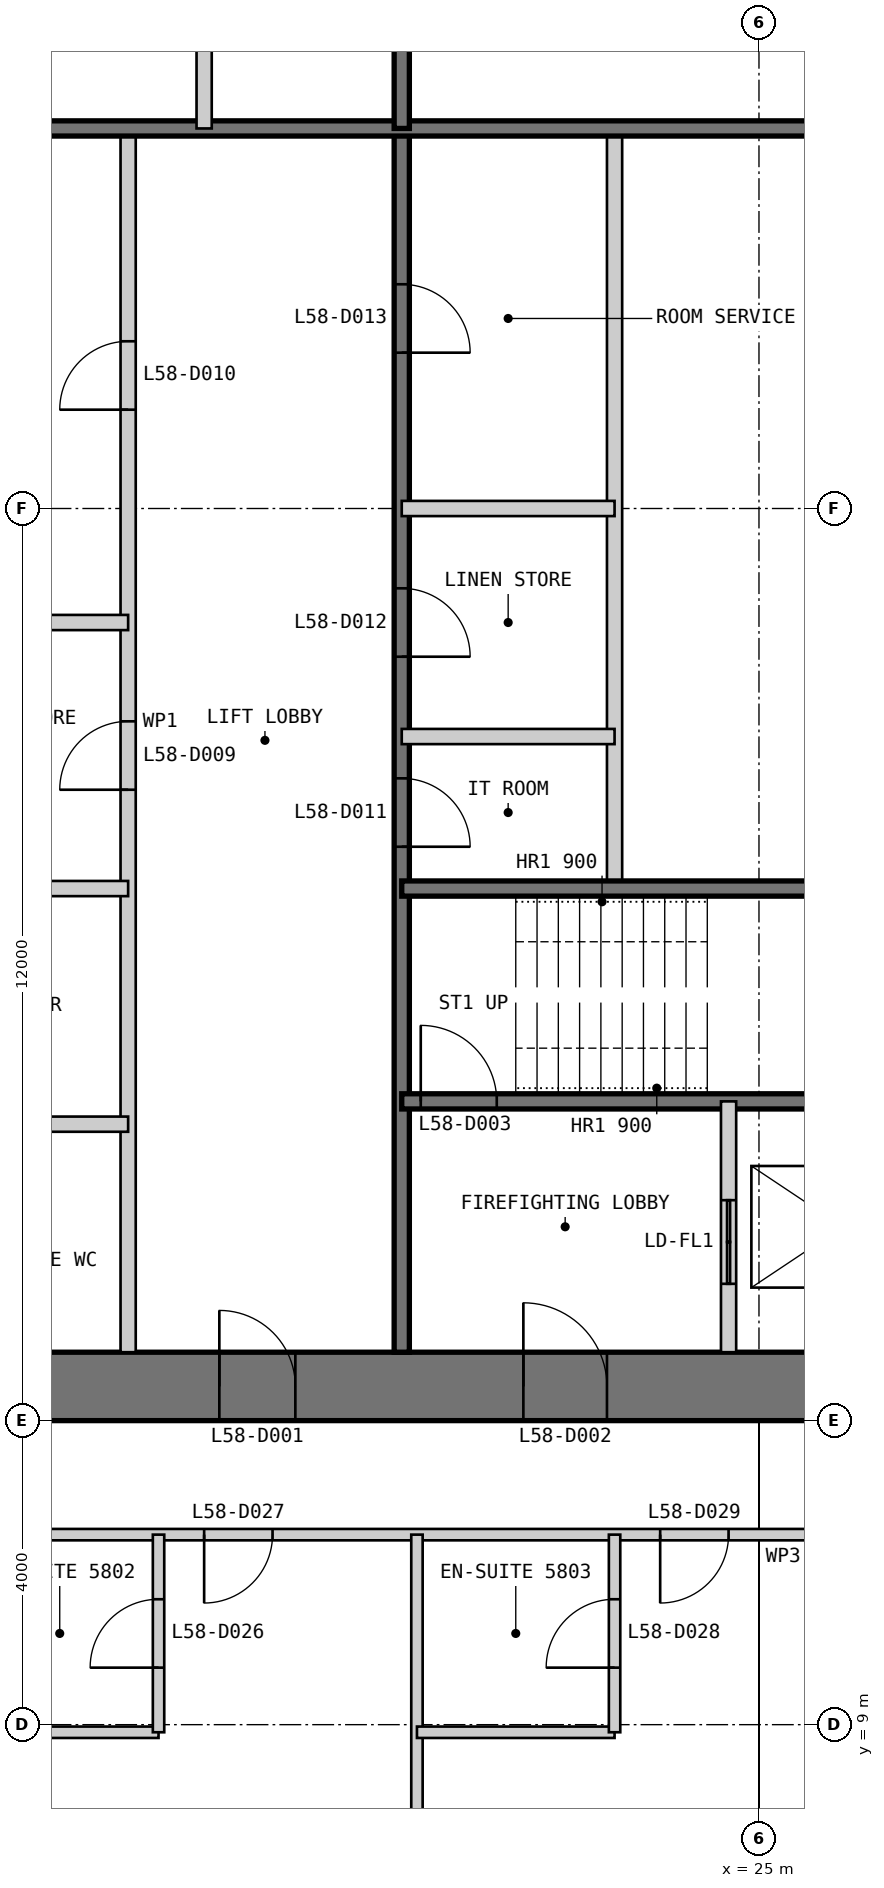
"""IFC4 building model, lengths in metres.
Left out: names, types, materials, properties, quantities, classifications, styles, units other than length and angle.
Written with IfcOpenShell. Run it as: python <this file> out.ifc"""

import sys

from ifc_helpers import new_model, si_unit, direction, frame, frame_2d, origin, place, context, subcontext, project, spatial, polyline, rectangle, outline, extrude, element, fill, save


model = new_model("IFC4")
c1 = context("Model", 3, precision=1e-05, world=origin(), true_north=direction((0.0, 1.0)))
c2 = subcontext(c1, "Body", "Model", "MODEL_VIEW")
j1 = project(units=[si_unit("LENGTHUNIT", "METRE"), si_unit("PLANEANGLEUNIT", "RADIAN")], contexts=[c1])
p1 = place(None, origin())
s1 = spatial("IfcSite", under=j1, at=p1, CompositionType="ELEMENT")
p2 = place(p1, origin())
s2 = spatial("IfcBuilding", under=s1, at=p2, CompositionType="ELEMENT")
p3 = place(p2, frame((0.0, 0.0, 249.2)))
s3 = spatial("IfcBuildingStorey", under=s2, at=p3, CompositionType="ELEMENT", Elevation=249.2)
p4 = place(p3, frame((13.0, 13.45, 0.0), z_axis=(0.0, 0.0, 1.0), x_axis=(1.0, 0.0, 0.0)))
e1 = element("IfcWall", 1, at=p4, inside=s3, PredefinedType="SHEAR", context=c2, shape_type="SweptSolid", body=[
    extrude(outline(polyline([(0.0, -0.45), (24.0, -0.45), (23.1, 0.45), (0.9, 0.45), (0.0, -0.45)])), origin(), (0.0, 0.0, 1.0), 3.4),
])
p5 = place(p4, frame((4.9, 0.0, 0.0)))
e2 = element("IfcOpeningElement", 2, at=p5, cuts=e1, PredefinedType="OPENING", context=c2, shape_type="SweptSolid", body=[
    extrude(rectangle(XDim=1.0, YDim=2.2, at=frame_2d((0.5, 1.1))), frame((0.0, 0.46, 0.0), z_axis=(0.0, -1.0, 0.0), x_axis=(1.0, 0.0, 0.0)), (0.0, 0.0, 1.0), 0.92),
])
p6 = place(p4, frame((8.9, 0.0, 0.0)))
e3 = element("IfcOpeningElement", 3, at=p6, cuts=e1, PredefinedType="OPENING", context=c2, shape_type="SweptSolid", body=[
    extrude(rectangle(XDim=1.1, YDim=2.2, at=frame_2d((0.55, 1.1))), frame((0.0, 0.46, 0.0), z_axis=(0.0, -1.0, 0.0), x_axis=(1.0, 0.0, 0.0)), (0.0, 0.0, 1.0), 0.92),
])
p7 = place(p4, frame((15.05, 0.0, 0.0)))
e4 = element("IfcOpeningElement", 4, at=p7, cuts=e1, PredefinedType="OPENING", context=c2, shape_type="SweptSolid", body=[
    extrude(rectangle(XDim=0.9, YDim=2.2, at=frame_2d((0.45, 1.1))), frame((0.0, 0.46, 0.0), z_axis=(0.0, -1.0, 0.0), x_axis=(1.0, 0.0, 0.0)), (0.0, 0.0, 1.0), 0.92),
])
p8 = place(p4, frame((17.9, 0.0, 0.0)))
e5 = element("IfcOpeningElement", 5, at=p8, cuts=e1, PredefinedType="OPENING", context=c2, shape_type="SweptSolid", body=[
    extrude(rectangle(XDim=1.0, YDim=2.2, at=frame_2d((0.5, 1.1))), frame((0.0, 0.46, 0.0), z_axis=(0.0, -1.0, 0.0), x_axis=(1.0, 0.0, 0.0)), (0.0, 0.0, 1.0), 0.92),
])
p9 = place(p4, frame((21.4, 0.0, 0.0)))
e6 = element("IfcOpeningElement", 6, at=p9, cuts=e1, PredefinedType="OPENING", context=c2, shape_type="SweptSolid", body=[
    extrude(rectangle(XDim=1.0, YDim=2.2, at=frame_2d((0.5, 1.1))), frame((0.0, 0.46, 0.0), z_axis=(0.0, -1.0, 0.0), x_axis=(1.0, 0.0, 0.0)), (0.0, 0.0, 1.0), 0.92),
])
p10 = place(p3, frame((16.7, 13.9, 0.0), z_axis=(0.0, 0.0, 1.0), x_axis=(0.0, 1.0, 0.0)))
e7 = element("IfcWall", 7, at=p10, inside=s3, PredefinedType="PARTITIONING", context=c2, shape_type="SweptSolid", body=[
    extrude(rectangle(XDim=16.1, YDim=0.2, at=frame_2d((8.05, 0.0))), origin(), (0.0, 0.0, 1.0), 3.2),
])
p11 = place(p10, frame((7.4, 0.0, 0.0)))
e8 = element("IfcOpeningElement", 8, at=p11, cuts=e7, PredefinedType="OPENING", context=c2, shape_type="SweptSolid", body=[
    extrude(rectangle(XDim=0.9, YDim=2.2, at=frame_2d((0.45, 1.1))), frame((0.0, 0.11, 0.0), z_axis=(0.0, -1.0, 0.0), x_axis=(1.0, 0.0, 0.0)), (0.0, 0.0, 1.0), 0.22),
])
p12 = place(p10, frame((12.4, 0.0, 0.0)))
e9 = element("IfcOpeningElement", 9, at=p12, cuts=e7, PredefinedType="OPENING", context=c2, shape_type="SweptSolid", body=[
    extrude(rectangle(XDim=0.9, YDim=2.2, at=frame_2d((0.45, 1.1))), frame((0.0, 0.11, 0.0), z_axis=(0.0, -1.0, 0.0), x_axis=(1.0, 0.0, 0.0)), (0.0, 0.0, 1.0), 0.22),
])
p13 = place(p3, frame((20.3, 13.9, 0.0), z_axis=(0.0, 0.0, 1.0), x_axis=(0.0, 1.0, 0.0)))
e10 = element("IfcWall", 10, at=p13, inside=s3, PredefinedType="SOLIDWALL", context=c2, shape_type="SweptSolid", body=[
    extrude(rectangle(XDim=16.1, YDim=0.2, at=frame_2d((8.05, 0.0))), origin(), (0.0, 0.0, 1.0), 3.2),
])
p14 = place(p13, frame((6.65, 0.0, 0.0)))
e11 = element("IfcOpeningElement", 11, at=p14, cuts=e10, PredefinedType="OPENING", context=c2, shape_type="SweptSolid", body=[
    extrude(rectangle(XDim=0.9, YDim=2.2, at=frame_2d((0.45, 1.1))), frame((0.0, 0.11, 0.0), z_axis=(0.0, -1.0, 0.0), x_axis=(1.0, 0.0, 0.0)), (0.0, 0.0, 1.0), 0.22),
])
p15 = place(p13, frame((9.15, 0.0, 0.0)))
e12 = element("IfcOpeningElement", 12, at=p15, cuts=e10, PredefinedType="OPENING", context=c2, shape_type="SweptSolid", body=[
    extrude(rectangle(XDim=0.9, YDim=2.2, at=frame_2d((0.45, 1.1))), frame((0.0, 0.11, 0.0), z_axis=(0.0, -1.0, 0.0), x_axis=(1.0, 0.0, 0.0)), (0.0, 0.0, 1.0), 0.22),
])
p16 = place(p13, frame((13.15, 0.0, 0.0)))
e13 = element("IfcOpeningElement", 13, at=p16, cuts=e10, PredefinedType="OPENING", context=c2, shape_type="SweptSolid", body=[
    extrude(rectangle(XDim=0.9, YDim=2.2, at=frame_2d((0.45, 1.1))), frame((0.0, 0.11, 0.0), z_axis=(0.0, -1.0, 0.0), x_axis=(1.0, 0.0, 0.0)), (0.0, 0.0, 1.0), 0.22),
])
p17 = place(p3, frame((23.1, 20.0, 0.0), z_axis=(0.0, 0.0, 1.0), x_axis=(0.0, 1.0, 0.0)))
e14 = element("IfcWall", 14, at=p17, inside=s3, PredefinedType="PARTITIONING", context=c2, shape_type="SweptSolid", body=[
    extrude(rectangle(XDim=10.0, YDim=0.2, at=frame_2d((5.0, 0.0))), origin(), (0.0, 0.0, 1.0), 3.2),
])
p18 = place(p3, frame((20.3, 17.2, 0.0), z_axis=(0.0, 0.0, 1.0), x_axis=(1.0, 0.0, 0.0)))
e15 = element("IfcWall", 15, at=p18, inside=s3, PredefinedType="SOLIDWALL", context=c2, shape_type="SweptSolid", body=[
    extrude(rectangle(XDim=9.4, YDim=0.2, at=frame_2d((4.7, 0.0))), origin(), (0.0, 0.0, 1.0), 3.2),
])
p19 = place(p18, frame((0.25, 0.0, 0.0)))
e16 = element("IfcOpeningElement", 16, at=p19, cuts=e15, PredefinedType="OPENING", context=c2, shape_type="SweptSolid", body=[
    extrude(rectangle(XDim=1.0, YDim=2.2, at=frame_2d((0.5, 1.1))), frame((0.0, 0.11, 0.0), z_axis=(0.0, -1.0, 0.0), x_axis=(1.0, 0.0, 0.0)), (0.0, 0.0, 1.0), 0.22),
])
p20 = place(p3, frame((20.3, 20.0, 0.0), z_axis=(0.0, 0.0, 1.0), x_axis=(1.0, 0.0, 0.0)))
e17 = element("IfcWall", 17, at=p20, inside=s3, PredefinedType="SOLIDWALL", context=c2, shape_type="SweptSolid", body=[
    extrude(rectangle(XDim=15.8, YDim=0.2, at=frame_2d((7.9, 0.0))), origin(), (0.0, 0.0, 1.0), 3.2),
])
p21 = place(p3, frame((24.6, 13.9, 0.0), z_axis=(0.0, 0.0, 1.0), x_axis=(0.0, 1.0, 0.0)))
e18 = element("IfcWall", 18, at=p21, inside=s3, PredefinedType="PARTITIONING", context=c2, shape_type="SweptSolid", body=[
    extrude(rectangle(XDim=3.3, YDim=0.2, at=frame_2d((1.65, 0.0))), origin(), (0.0, 0.0, 1.0), 3.2),
])
p22 = place(p21, frame((0.9, 0.0, 0.0)))
e19 = element("IfcOpeningElement", 19, at=p22, cuts=e18, PredefinedType="OPENING", context=c2, shape_type="SweptSolid", body=[
    extrude(rectangle(XDim=1.1, YDim=2.2, at=frame_2d((0.55, 1.1))), frame((0.0, 0.11, 0.0), z_axis=(0.0, -1.0, 0.0), x_axis=(1.0, 0.0, 0.0)), (0.0, 0.0, 1.0), 0.22),
])
for number, where, z_axis, x_axis in (
    (20, (13.9, 16.9, 0.0), (0.0, 0.0, 1.0), (1.0, 0.0, 0.0)),
    (21, (13.9, 20.0, 0.0), (0.0, 0.0, 1.0), (1.0, 0.0, 0.0)),
    (22, (13.9, 23.5, 0.0), (0.0, 0.0, 1.0), (1.0, 0.0, 0.0)),
    (23, (20.3, 22.0, 0.0), (0.0, 0.0, 1.0), (1.0, 0.0, 0.0)),
    (24, (20.3, 25.0, 0.0), (0.0, 0.0, 1.0), (1.0, 0.0, 0.0)),
):
    element("IfcWall", number, at=place(p3, frame(where, z_axis=z_axis, x_axis=x_axis)), inside=s3, PredefinedType="PARTITIONING", context=c2, shape_type="SweptSolid", body=[
        extrude(rectangle(XDim=2.8, YDim=0.2, at=frame_2d((1.4, 0.0))), origin(), (0.0, 0.0, 1.0), 3.2),
    ])
p23 = place(p3, frame((29.7, 30.0, 0.0), z_axis=(0.0, 0.0, 1.0), x_axis=(-1.0, 0.0, 0.0)))
e25 = element("IfcWall", 25, at=p23, inside=s3, PredefinedType="SOLIDWALL", context=c2, shape_type="SweptSolid", body=[
    extrude(rectangle(XDim=15.8, YDim=0.2, at=frame_2d((7.9, 0.0))), origin(), (0.0, 0.0, 1.0), 3.2),
])
p24 = place(p3, frame((20.3, 36.1, 0.0), z_axis=(0.0, 0.0, 1.0), x_axis=(0.0, -1.0, 0.0)))
e26 = element("IfcWall", 26, at=p24, inside=s3, PredefinedType="SOLIDWALL", context=c2, shape_type="SweptSolid", body=[
    extrude(rectangle(XDim=6.1, YDim=0.2, at=frame_2d((3.05, 0.0))), origin(), (0.0, 0.0, 1.0), 3.2),
])
p25 = place(p3, frame((17.7, 36.1, 0.0), z_axis=(0.0, 0.0, 1.0), x_axis=(0.0, -1.0, 0.0)))
e27 = element("IfcWall", 27, at=p25, inside=s3, PredefinedType="PARTITIONING", context=c2, shape_type="SweptSolid", body=[
    extrude(rectangle(XDim=6.1, YDim=0.2, at=frame_2d((3.05, 0.0))), origin(), (0.0, 0.0, 1.0), 3.2),
])
p26 = place(p3, frame((11.5, 11.5, 0.0), z_axis=(0.0, 0.0, 1.0), x_axis=(1.0, 0.0, 0.0)))
e28 = element("IfcWall", 28, at=p26, inside=s3, PredefinedType="PARTITIONING", context=c2, shape_type="SweptSolid", body=[
    extrude(rectangle(XDim=27.0, YDim=0.15, at=frame_2d((13.5, 0.0))), origin(), (0.0, 0.0, 1.0), 3.25),
])
p27 = place(p26, frame((1.85, 0.0, 0.0)))
e29 = element("IfcOpeningElement", 29, at=p27, cuts=e28, PredefinedType="OPENING", context=c2, shape_type="SweptSolid", body=[
    extrude(rectangle(XDim=0.9, YDim=2.1, at=frame_2d((0.45, 1.05))), frame((0.0, 0.085, 0.0), z_axis=(0.0, -1.0, 0.0), x_axis=(1.0, 0.0, 0.0)), (0.0, 0.0, 1.0), 0.17),
])
p28 = place(p26, frame((6.2, 0.0, 0.0)))
e30 = element("IfcOpeningElement", 30, at=p28, cuts=e28, PredefinedType="OPENING", context=c2, shape_type="SweptSolid", body=[
    extrude(rectangle(XDim=0.9, YDim=2.1, at=frame_2d((0.45, 1.05))), frame((0.0, 0.085, 0.0), z_axis=(0.0, -1.0, 0.0), x_axis=(1.0, 0.0, 0.0)), (0.0, 0.0, 1.0), 0.17),
])
p29 = place(p26, frame((12.2, 0.0, 0.0)))
e31 = element("IfcOpeningElement", 31, at=p29, cuts=e28, PredefinedType="OPENING", context=c2, shape_type="SweptSolid", body=[
    extrude(rectangle(XDim=0.9, YDim=2.1, at=frame_2d((0.45, 1.05))), frame((0.0, 0.085, 0.0), z_axis=(0.0, -1.0, 0.0), x_axis=(1.0, 0.0, 0.0)), (0.0, 0.0, 1.0), 0.17),
])
p30 = place(p26, frame((18.8, 0.0, 0.0)))
e32 = element("IfcOpeningElement", 32, at=p30, cuts=e28, PredefinedType="OPENING", context=c2, shape_type="SweptSolid", body=[
    extrude(rectangle(XDim=1.0, YDim=2.1, at=frame_2d((0.5, 1.05))), frame((0.0, 0.085, 0.0), z_axis=(0.0, -1.0, 0.0), x_axis=(1.0, 0.0, 0.0)), (0.0, 0.0, 1.0), 0.17),
])
p31 = place(p26, frame((24.2, 0.0, 0.0)))
e33 = element("IfcOpeningElement", 33, at=p31, cuts=e28, PredefinedType="OPENING", context=c2, shape_type="SweptSolid", body=[
    extrude(rectangle(XDim=0.9, YDim=2.1, at=frame_2d((0.45, 1.05))), frame((0.0, 0.085, 0.0), z_axis=(0.0, -1.0, 0.0), x_axis=(1.0, 0.0, 0.0)), (0.0, 0.0, 1.0), 0.17),
])
p32 = place(p3, frame((14.5, 8.9, 0.0), z_axis=(0.0, 0.0, 1.0), x_axis=(1.0, 0.0, 0.0)))
e34 = element("IfcWall", 34, at=p32, inside=s3, PredefinedType="PARTITIONING", context=c2, shape_type="SweptSolid", body=[
    extrude(rectangle(XDim=2.6, YDim=0.15, at=frame_2d((1.3, 0.0))), origin(), (0.0, 0.0, 1.0), 3.25),
])
p33 = place(p3, frame((17.1, 8.9, 0.0), z_axis=(0.0, 0.0, 1.0), x_axis=(0.0, 1.0, 0.0)))
e35 = element("IfcWall", 35, at=p33, inside=s3, PredefinedType="PARTITIONING", context=c2, shape_type="SweptSolid", body=[
    extrude(rectangle(XDim=2.6, YDim=0.15, at=frame_2d((1.3, 0.0))), origin(), (0.0, 0.0, 1.0), 3.25),
])
p34 = place(p33, frame((0.85, 0.0, 0.0)))
e36 = element("IfcOpeningElement", 36, at=p34, cuts=e35, PredefinedType="OPENING", context=c2, shape_type="SweptSolid", body=[
    extrude(rectangle(XDim=0.9, YDim=2.1, at=frame_2d((0.45, 1.05))), frame((0.0, 0.085, 0.0), z_axis=(0.0, -1.0, 0.0), x_axis=(1.0, 0.0, 0.0)), (0.0, 0.0, 1.0), 0.17),
])
p35 = place(p3, frame((20.5, 0.15, 0.0), z_axis=(0.0, 0.0, 1.0), x_axis=(0.0, 1.0, 0.0)))
e37 = element("IfcWall", 37, at=p35, inside=s3, PredefinedType="PARTITIONING", context=c2, shape_type="SweptSolid", body=[
    extrude(rectangle(XDim=11.35, YDim=0.15, at=frame_2d((5.675, 0.0))), origin(), (0.0, 0.0, 1.0), 3.25),
])
p36 = place(p3, frame((20.5, 8.9, 0.0), z_axis=(0.0, 0.0, 1.0), x_axis=(1.0, 0.0, 0.0)))
e38 = element("IfcWall", 38, at=p36, inside=s3, PredefinedType="PARTITIONING", context=c2, shape_type="SweptSolid", body=[
    extrude(rectangle(XDim=2.6, YDim=0.15, at=frame_2d((1.3, 0.0))), origin(), (0.0, 0.0, 1.0), 3.25),
])
p37 = place(p3, frame((23.1, 8.9, 0.0), z_axis=(0.0, 0.0, 1.0), x_axis=(0.0, 1.0, 0.0)))
e39 = element("IfcWall", 39, at=p37, inside=s3, PredefinedType="PARTITIONING", context=c2, shape_type="SweptSolid", body=[
    extrude(rectangle(XDim=2.6, YDim=0.15, at=frame_2d((1.3, 0.0))), origin(), (0.0, 0.0, 1.0), 3.25),
])
p38 = place(p37, frame((0.85, 0.0, 0.0)))
e40 = element("IfcOpeningElement", 40, at=p38, cuts=e39, PredefinedType="OPENING", context=c2, shape_type="SweptSolid", body=[
    extrude(rectangle(XDim=0.9, YDim=2.1, at=frame_2d((0.45, 1.05))), frame((0.0, 0.085, 0.0), z_axis=(0.0, -1.0, 0.0), x_axis=(1.0, 0.0, 0.0)), (0.0, 0.0, 1.0), 0.17),
])
p39 = place(p5, origin())
e41 = element("IfcDoor", 41, at=p39, inside=s3, OperationType="SINGLE_SWING_LEFT", PredefinedType="DOOR", context=c2, shape_type="SweptSolid", body=[
    extrude(rectangle(XDim=1.0, YDim=2.2, at=frame_2d((0.5, 1.1))), frame((0.0, 0.025, 0.0), z_axis=(0.0, -1.0, 0.0), x_axis=(1.0, 0.0, 0.0)), (0.0, 0.0, 1.0), 0.05),
    extrude(outline(polyline([(0.0, 0.0), (0.04, 0.0), (0.04, 2.16), (0.96, 2.16), (0.96, 0.0), (1.0, 0.0), (1.0, 2.2), (0.0, 2.2), (0.0, 0.0)])), frame((0.0, 0.3, 0.0), z_axis=(0.0, -1.0, 0.0), x_axis=(1.0, 0.0, 0.0)), (0.0, 0.0, 1.0), 0.6),
])
fill(e2, e41)
p40 = place(p6, origin())
e42 = element("IfcDoor", 42, at=p40, inside=s3, OperationType="SINGLE_SWING_LEFT", PredefinedType="DOOR", context=c2, shape_type="SweptSolid", body=[
    extrude(rectangle(XDim=1.1, YDim=2.2, at=frame_2d((0.55, 1.1))), frame((0.0, 0.025, 0.0), z_axis=(0.0, -1.0, 0.0), x_axis=(1.0, 0.0, 0.0)), (0.0, 0.0, 1.0), 0.05),
    extrude(outline(polyline([(0.0, 0.0), (0.04, 0.0), (0.04, 2.16), (1.06, 2.16), (1.06, 0.0), (1.1, 0.0), (1.1, 2.2), (0.0, 2.2), (0.0, 0.0)])), frame((0.0, 0.3, 0.0), z_axis=(0.0, -1.0, 0.0), x_axis=(1.0, 0.0, 0.0)), (0.0, 0.0, 1.0), 0.6),
])
fill(e3, e42)
p41 = place(p19, origin())
e43 = element("IfcDoor", 43, at=p41, inside=s3, OperationType="SINGLE_SWING_LEFT", PredefinedType="DOOR", context=c2, shape_type="SweptSolid", body=[
    extrude(rectangle(XDim=1.0, YDim=2.2, at=frame_2d((0.5, 1.1))), frame((0.0, 0.025, 0.0), z_axis=(0.0, -1.0, 0.0), x_axis=(1.0, 0.0, 0.0)), (0.0, 0.0, 1.0), 0.05),
])
fill(e16, e43)
p42 = place(p11, origin())
e44 = element("IfcDoor", 44, at=p42, inside=s3, OperationType="SINGLE_SWING_LEFT", PredefinedType="DOOR", context=c2, shape_type="SweptSolid", body=[
    extrude(rectangle(XDim=0.9, YDim=2.2, at=frame_2d((0.45, 1.1))), frame((0.0, 0.025, 0.0), z_axis=(0.0, -1.0, 0.0), x_axis=(1.0, 0.0, 0.0)), (0.0, 0.0, 1.0), 0.05),
])
fill(e8, e44)
p43 = place(p12, origin())
e45 = element("IfcDoor", 45, at=p43, inside=s3, OperationType="SINGLE_SWING_LEFT", PredefinedType="DOOR", context=c2, shape_type="SweptSolid", body=[
    extrude(rectangle(XDim=0.9, YDim=2.2, at=frame_2d((0.45, 1.1))), frame((0.0, 0.025, 0.0), z_axis=(0.0, -1.0, 0.0), x_axis=(1.0, 0.0, 0.0)), (0.0, 0.0, 1.0), 0.05),
])
fill(e9, e45)
p44 = place(p14, frame((0.9, 0.0, 0.0), z_axis=(0.0, 0.0, 1.0), x_axis=(-1.0, 0.0, 0.0)))
e46 = element("IfcDoor", 46, at=p44, inside=s3, OperationType="SINGLE_SWING_RIGHT", PredefinedType="DOOR", context=c2, shape_type="SweptSolid", body=[
    extrude(rectangle(XDim=0.9, YDim=2.2, at=frame_2d((0.45, 1.1))), frame((0.0, 0.025, 0.0), z_axis=(0.0, -1.0, 0.0), x_axis=(1.0, 0.0, 0.0)), (0.0, 0.0, 1.0), 0.05),
])
fill(e11, e46)
p45 = place(p15, frame((0.9, 0.0, 0.0), z_axis=(0.0, 0.0, 1.0), x_axis=(-1.0, 0.0, 0.0)))
e47 = element("IfcDoor", 47, at=p45, inside=s3, OperationType="SINGLE_SWING_RIGHT", PredefinedType="DOOR", context=c2, shape_type="SweptSolid", body=[
    extrude(rectangle(XDim=0.9, YDim=2.2, at=frame_2d((0.45, 1.1))), frame((0.0, 0.025, 0.0), z_axis=(0.0, -1.0, 0.0), x_axis=(1.0, 0.0, 0.0)), (0.0, 0.0, 1.0), 0.05),
])
fill(e12, e47)
p46 = place(p16, frame((0.9, 0.0, 0.0), z_axis=(0.0, 0.0, 1.0), x_axis=(-1.0, 0.0, 0.0)))
e48 = element("IfcDoor", 48, at=p46, inside=s3, OperationType="SINGLE_SWING_RIGHT", PredefinedType="DOOR", context=c2, shape_type="SweptSolid", body=[
    extrude(rectangle(XDim=0.9, YDim=2.2, at=frame_2d((0.45, 1.1))), frame((0.0, 0.025, 0.0), z_axis=(0.0, -1.0, 0.0), x_axis=(1.0, 0.0, 0.0)), (0.0, 0.0, 1.0), 0.05),
])
fill(e13, e48)
p47 = place(p34, origin())
e49 = element("IfcDoor", 49, at=p47, inside=s3, OperationType="SINGLE_SWING_LEFT", PredefinedType="DOOR", context=c2, shape_type="SweptSolid", body=[
    extrude(rectangle(XDim=0.9, YDim=2.1, at=frame_2d((0.45, 1.05))), frame((0.0, 0.025, 0.0), z_axis=(0.0, -1.0, 0.0), x_axis=(1.0, 0.0, 0.0)), (0.0, 0.0, 1.0), 0.05),
])
fill(e36, e49)
p48 = place(p28, frame((0.9, 0.0, 0.0), z_axis=(0.0, 0.0, 1.0), x_axis=(-1.0, 0.0, 0.0)))
e50 = element("IfcDoor", 50, at=p48, inside=s3, OperationType="SINGLE_SWING_RIGHT", PredefinedType="DOOR", context=c2, shape_type="SweptSolid", body=[
    extrude(rectangle(XDim=0.9, YDim=2.1, at=frame_2d((0.45, 1.05))), frame((0.0, 0.025, 0.0), z_axis=(0.0, -1.0, 0.0), x_axis=(1.0, 0.0, 0.0)), (0.0, 0.0, 1.0), 0.05),
])
fill(e30, e50)
p49 = place(p38, origin())
e51 = element("IfcDoor", 51, at=p49, inside=s3, OperationType="SINGLE_SWING_LEFT", PredefinedType="DOOR", context=c2, shape_type="SweptSolid", body=[
    extrude(rectangle(XDim=0.9, YDim=2.1, at=frame_2d((0.45, 1.05))), frame((0.0, 0.025, 0.0), z_axis=(0.0, -1.0, 0.0), x_axis=(1.0, 0.0, 0.0)), (0.0, 0.0, 1.0), 0.05),
])
fill(e40, e51)
p50 = place(p29, frame((0.9, 0.0, 0.0), z_axis=(0.0, 0.0, 1.0), x_axis=(-1.0, 0.0, 0.0)))
e52 = element("IfcDoor", 52, at=p50, inside=s3, OperationType="SINGLE_SWING_RIGHT", PredefinedType="DOOR", context=c2, shape_type="SweptSolid", body=[
    extrude(rectangle(XDim=0.9, YDim=2.1, at=frame_2d((0.45, 1.05))), frame((0.0, 0.025, 0.0), z_axis=(0.0, -1.0, 0.0), x_axis=(1.0, 0.0, 0.0)), (0.0, 0.0, 1.0), 0.05),
])
fill(e31, e52)
p51 = place(p22, origin())
e53 = element("IfcDoor", 53, at=p51, inside=s3, OperationType="DOUBLE_DOOR_SLIDING", PredefinedType="DOOR", context=c2, shape_type="SweptSolid", body=[
    extrude(rectangle(XDim=1.1, YDim=2.2, at=frame_2d((0.55, 1.1))), frame((0.0, 0.025, 0.0), z_axis=(0.0, -1.0, 0.0), x_axis=(1.0, 0.0, 0.0)), (0.0, 0.0, 1.0), 0.05),
])
fill(e19, e53)
save(model, sys.argv[1])
